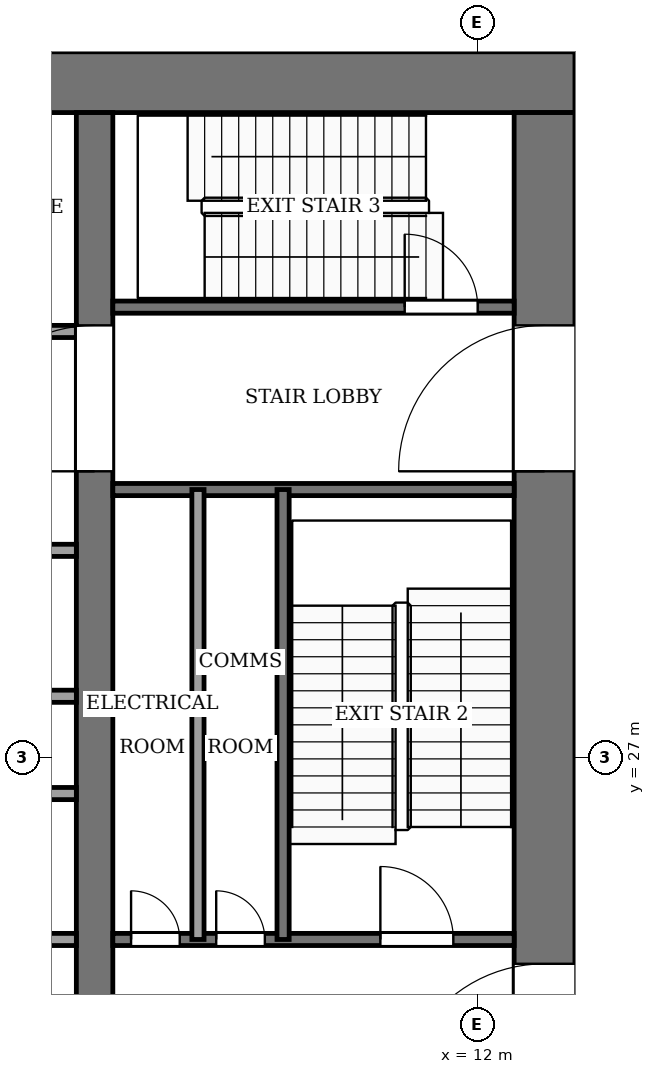
"""IFC4 building model, lengths in metres.
Left out: names, types, materials, properties, quantities, classifications, styles, units other than length and angle.
Written with IfcOpenShell. Run it as: python <this file> out.ifc"""

import sys

from ifc_helpers import new_model, si_unit, direction, frame, frame_2d, origin, place, context, subcontext, project, spatial, rectangle, extrude, element, fill, save


model = new_model("IFC4")
c1 = context("Model", 3, precision=1e-05, world=origin(), true_north=direction((0.0, 1.0)))
c2 = subcontext(c1, "Body", "Model", "MODEL_VIEW")
j1 = project(units=[si_unit("LENGTHUNIT", "METRE"), si_unit("PLANEANGLEUNIT", "RADIAN")], contexts=[c1])
p1 = place(None, origin())
s1 = spatial("IfcSite", under=j1, at=p1, CompositionType="ELEMENT")
p2 = place(p1, origin())
s2 = spatial("IfcBuilding", under=s1, at=p2, CompositionType="ELEMENT")
p3 = place(p2, frame((0.0, 0.0, 121.0)))
s3 = spatial("IfcBuildingStorey", under=s2, at=p3, CompositionType="ELEMENT", Elevation=121.0)
p4 = place(p3, frame((-13.6, 38.1, -0.13), z_axis=(0.0, 0.0, 1.0), x_axis=(1.0, 0.0, 0.0)))
e1 = element("IfcWall", 1, at=p4, inside=s3, PredefinedType="SHEAR", context=c2, shape_type="SweptSolid", body=[
    extrude(rectangle(XDim=27.2, YDim=1.0, at=frame_2d((13.6, 0.0))), origin(), (0.0, 0.0, 1.0), 5.0),
])
p5 = place(p3, frame((13.1, 18.4, -0.13), z_axis=(0.0, 0.0, 1.0), x_axis=(0.0, 1.0, 0.0)))
e2 = element("IfcWall", 2, at=p5, inside=s3, PredefinedType="SHEAR", context=c2, shape_type="SweptSolid", body=[
    extrude(rectangle(XDim=19.2, YDim=1.0, at=frame_2d((9.6, 0.0))), origin(), (0.0, 0.0, 1.0), 5.0),
])
p6 = place(p5, frame((2.8, 0.0, 0.13)))
e3 = element("IfcOpeningElement", 3, at=p6, cuts=e2, PredefinedType="OPENING", context=c2, shape_type="SweptSolid", body=[
    extrude(rectangle(XDim=2.4, YDim=2.4, at=frame_2d((1.2, 1.2))), frame((0.0, 0.51, 0.0), z_axis=(0.0, -1.0, 0.0), x_axis=(1.0, 0.0, 0.0)), (0.0, 0.0, 1.0), 1.02),
])
p7 = place(p5, frame((13.3, 0.0, 0.13)))
e4 = element("IfcOpeningElement", 4, at=p7, cuts=e2, PredefinedType="OPENING", context=c2, shape_type="SweptSolid", body=[
    extrude(rectangle(XDim=2.4, YDim=2.4, at=frame_2d((1.2, 1.2))), frame((0.0, 0.51, 0.0), z_axis=(0.0, -1.0, 0.0), x_axis=(1.0, 0.0, 0.0)), (0.0, 0.0, 1.0), 1.02),
])
p8 = place(p3, frame((5.7, 18.4, -0.13), z_axis=(0.0, 0.0, 1.0), x_axis=(0.0, 1.0, 0.0)))
e5 = element("IfcWall", 5, at=p8, inside=s3, PredefinedType="SHEAR", context=c2, shape_type="SweptSolid", body=[
    extrude(rectangle(XDim=19.2, YDim=0.6, at=frame_2d((9.6, 0.0))), origin(), (0.0, 0.0, 1.0), 5.0),
])
p9 = place(p8, frame((13.3, 0.0, 0.13)))
e6 = element("IfcOpeningElement", 6, at=p9, cuts=e5, PredefinedType="OPENING", context=c2, shape_type="SweptSolid", body=[
    extrude(rectangle(XDim=2.4, YDim=2.4, at=frame_2d((1.2, 1.2))), frame((0.0, 0.31, 0.0), z_axis=(0.0, -1.0, 0.0), x_axis=(1.0, 0.0, 0.0)), (0.0, 0.0, 1.0), 0.62),
])
p10 = place(p3, frame((-5.4, 24.0, 0.0), z_axis=(0.0, 0.0, 1.0), x_axis=(1.0, 0.0, 0.0)))
e7 = element("IfcWall", 7, at=p10, inside=s3, PredefinedType="PARTITIONING", context=c2, shape_type="SweptSolid", body=[
    extrude(rectangle(XDim=10.8, YDim=0.2, at=frame_2d((5.4, 0.0))), origin(), (0.0, 0.0, 1.0), 4.87),
])
p11 = place(p10, frame((0.75, 0.0, 0.0)))
e8 = element("IfcOpeningElement", 8, at=p11, cuts=e7, PredefinedType="OPENING", context=c2, shape_type="SweptSolid", body=[
    extrude(rectangle(XDim=1.2, YDim=2.2, at=frame_2d((0.6, 1.1))), frame((0.0, 0.11, 0.0), z_axis=(0.0, -1.0, 0.0), x_axis=(1.0, 0.0, 0.0)), (0.0, 0.0, 1.0), 0.22),
])
p12 = place(p10, frame((3.45, 0.0, 0.0)))
e9 = element("IfcOpeningElement", 9, at=p12, cuts=e7, PredefinedType="OPENING", context=c2, shape_type="SweptSolid", body=[
    extrude(rectangle(XDim=1.2, YDim=2.2, at=frame_2d((0.6, 1.1))), frame((0.0, 0.11, 0.0), z_axis=(0.0, -1.0, 0.0), x_axis=(1.0, 0.0, 0.0)), (0.0, 0.0, 1.0), 0.22),
])
p13 = place(p10, frame((6.15, 0.0, 0.0)))
e10 = element("IfcOpeningElement", 10, at=p13, cuts=e7, PredefinedType="OPENING", context=c2, shape_type="SweptSolid", body=[
    extrude(rectangle(XDim=1.2, YDim=2.2, at=frame_2d((0.6, 1.1))), frame((0.0, 0.11, 0.0), z_axis=(0.0, -1.0, 0.0), x_axis=(1.0, 0.0, 0.0)), (0.0, 0.0, 1.0), 0.22),
])
p14 = place(p10, frame((8.85, 0.0, 0.0)))
e11 = element("IfcOpeningElement", 11, at=p14, cuts=e7, PredefinedType="OPENING", context=c2, shape_type="SweptSolid", body=[
    extrude(rectangle(XDim=1.2, YDim=2.2, at=frame_2d((0.6, 1.1))), frame((0.0, 0.11, 0.0), z_axis=(0.0, -1.0, 0.0), x_axis=(1.0, 0.0, 0.0)), (0.0, 0.0, 1.0), 0.22),
])
p15 = place(p3, frame((6.0, 24.0, 0.0), z_axis=(0.0, 0.0, 1.0), x_axis=(1.0, 0.0, 0.0)))
e12 = element("IfcWall", 12, at=p15, inside=s3, PredefinedType="PARTITIONING", context=c2, shape_type="SweptSolid", body=[
    extrude(rectangle(XDim=6.6, YDim=0.2, at=frame_2d((3.3, 0.0))), origin(), (0.0, 0.0, 1.0), 4.87),
])
p16 = place(p15, frame((0.3, 0.0, 0.0)))
e13 = element("IfcOpeningElement", 13, at=p16, cuts=e12, PredefinedType="OPENING", context=c2, shape_type="SweptSolid", body=[
    extrude(rectangle(XDim=0.8, YDim=2.1, at=frame_2d((0.4, 1.05))), frame((0.0, 0.11, 0.0), z_axis=(0.0, -1.0, 0.0), x_axis=(1.0, 0.0, 0.0)), (0.0, 0.0, 1.0), 0.22),
])
p17 = place(p15, frame((1.7, 0.0, 0.0)))
e14 = element("IfcOpeningElement", 14, at=p17, cuts=e12, PredefinedType="OPENING", context=c2, shape_type="SweptSolid", body=[
    extrude(rectangle(XDim=0.8, YDim=2.1, at=frame_2d((0.4, 1.05))), frame((0.0, 0.11, 0.0), z_axis=(0.0, -1.0, 0.0), x_axis=(1.0, 0.0, 0.0)), (0.0, 0.0, 1.0), 0.22),
])
p18 = place(p15, frame((4.4, 0.0, 0.0)))
e15 = element("IfcOpeningElement", 15, at=p18, cuts=e12, PredefinedType="OPENING", context=c2, shape_type="SweptSolid", body=[
    extrude(rectangle(XDim=1.2, YDim=2.2, at=frame_2d((0.6, 1.1))), frame((0.0, 0.11, 0.0), z_axis=(0.0, -1.0, 0.0), x_axis=(1.0, 0.0, 0.0)), (0.0, 0.0, 1.0), 0.22),
])
for number, where, z_axis, x_axis in (
    (16, (-5.4, 26.4, 0.0), (0.0, 0.0, 1.0), (1.0, 0.0, 0.0)),
    (17, (-5.4, 28.0, 0.0), (0.0, 0.0, 1.0), (1.0, 0.0, 0.0)),
    (18, (-5.4, 30.4, 0.0), (0.0, 0.0, 1.0), (1.0, 0.0, 0.0)),
):
    element("IfcWall", number, at=place(p3, frame(where, z_axis=z_axis, x_axis=x_axis)), inside=s3, PredefinedType="PARTITIONING", context=c2, shape_type="SweptSolid", body=[
        extrude(rectangle(XDim=10.8, YDim=0.2, at=frame_2d((5.4, 0.0))), origin(), (0.0, 0.0, 1.0), 4.87),
    ])
p19 = place(p3, frame((6.0, 31.4, 0.0), z_axis=(0.0, 0.0, 1.0), x_axis=(1.0, 0.0, 0.0)))
e19 = element("IfcWall", 19, at=p19, inside=s3, PredefinedType="PARTITIONING", context=c2, shape_type="SweptSolid", body=[
    extrude(rectangle(XDim=6.6, YDim=0.2, at=frame_2d((3.3, 0.0))), origin(), (0.0, 0.0, 1.0), 4.87),
])
p20 = place(p3, frame((-5.4, 34.0, 0.0), z_axis=(0.0, 0.0, 1.0), x_axis=(1.0, 0.0, 0.0)))
e20 = element("IfcWall", 20, at=p20, inside=s3, PredefinedType="PARTITIONING", context=c2, shape_type="SweptSolid", body=[
    extrude(rectangle(XDim=10.8, YDim=0.2, at=frame_2d((5.4, 0.0))), origin(), (0.0, 0.0, 1.0), 4.87),
])
p21 = place(p20, frame((6.15, 0.0, 0.0)))
e21 = element("IfcOpeningElement", 21, at=p21, cuts=e20, PredefinedType="OPENING", context=c2, shape_type="SweptSolid", body=[
    extrude(rectangle(XDim=1.2, YDim=2.2, at=frame_2d((0.6, 1.1))), frame((0.0, 0.11, 0.0), z_axis=(0.0, -1.0, 0.0), x_axis=(1.0, 0.0, 0.0)), (0.0, 0.0, 1.0), 0.22),
])
p22 = place(p20, frame((8.95, 0.0, 0.0)))
e22 = element("IfcOpeningElement", 22, at=p22, cuts=e20, PredefinedType="OPENING", context=c2, shape_type="SweptSolid", body=[
    extrude(rectangle(XDim=1.0, YDim=2.1, at=frame_2d((0.5, 1.05))), frame((0.0, 0.11, 0.0), z_axis=(0.0, -1.0, 0.0), x_axis=(1.0, 0.0, 0.0)), (0.0, 0.0, 1.0), 0.22),
])
p23 = place(p3, frame((6.0, 34.4, 0.0), z_axis=(0.0, 0.0, 1.0), x_axis=(1.0, 0.0, 0.0)))
e23 = element("IfcWall", 23, at=p23, inside=s3, PredefinedType="PARTITIONING", context=c2, shape_type="SweptSolid", body=[
    extrude(rectangle(XDim=6.6, YDim=0.2, at=frame_2d((3.3, 0.0))), origin(), (0.0, 0.0, 1.0), 4.87),
])
p24 = place(p23, frame((4.8, 0.0, 0.0)))
e24 = element("IfcOpeningElement", 24, at=p24, cuts=e23, PredefinedType="OPENING", context=c2, shape_type="SweptSolid", body=[
    extrude(rectangle(XDim=1.2, YDim=2.2, at=frame_2d((0.6, 1.1))), frame((0.0, 0.11, 0.0), z_axis=(0.0, -1.0, 0.0), x_axis=(1.0, 0.0, 0.0)), (0.0, 0.0, 1.0), 0.22),
])
for number, where, z_axis, x_axis in (
    (25, (7.4, 24.0, 0.0), (0.0, 0.0, 1.0), (0.0, 1.0, 0.0)),
    (26, (8.8, 24.0, 0.0), (0.0, 0.0, 1.0), (0.0, 1.0, 0.0)),
):
    element("IfcWall", number, at=place(p3, frame(where, z_axis=z_axis, x_axis=x_axis)), inside=s3, PredefinedType="PARTITIONING", context=c2, shape_type="SweptSolid", body=[
        extrude(rectangle(XDim=7.4, YDim=0.2, at=frame_2d((3.7, 0.0))), origin(), (0.0, 0.0, 1.0), 4.87),
    ])
p25 = place(p16, origin())
e27 = element("IfcDoor", 27, at=p25, inside=s3, OperationType="SINGLE_SWING_LEFT", PredefinedType="DOOR", context=c2, shape_type="SweptSolid", body=[
    extrude(rectangle(XDim=0.8, YDim=2.1, at=frame_2d((0.4, 1.05))), frame((0.0, 0.025, 0.0), z_axis=(0.0, -1.0, 0.0), x_axis=(1.0, 0.0, 0.0)), (0.0, 0.0, 1.0), 0.05),
])
fill(e13, e27)
p26 = place(p17, origin())
e28 = element("IfcDoor", 28, at=p26, inside=s3, OperationType="SINGLE_SWING_RIGHT", PredefinedType="DOOR", context=c2, shape_type="SweptSolid", body=[
    extrude(rectangle(XDim=0.8, YDim=2.1, at=frame_2d((0.4, 1.05))), frame((0.0, 0.025, 0.0), z_axis=(0.0, -1.0, 0.0), x_axis=(1.0, 0.0, 0.0)), (0.0, 0.0, 1.0), 0.05),
])
fill(e14, e28)
p27 = place(p18, origin())
e29 = element("IfcDoor", 29, at=p27, inside=s3, OperationType="SINGLE_SWING_LEFT", PredefinedType="DOOR", context=c2, shape_type="SweptSolid", body=[
    extrude(rectangle(XDim=1.2, YDim=2.2, at=frame_2d((0.6, 1.1))), frame((0.0, 0.025, 0.0), z_axis=(0.0, -1.0, 0.0), x_axis=(1.0, 0.0, 0.0)), (0.0, 0.0, 1.0), 0.05),
])
fill(e15, e29)
p28 = place(p24, origin())
e30 = element("IfcDoor", 30, at=p28, inside=s3, OperationType="SINGLE_SWING_RIGHT", PredefinedType="DOOR", context=c2, shape_type="SweptSolid", body=[
    extrude(rectangle(XDim=1.2, YDim=2.2, at=frame_2d((0.6, 1.1))), frame((0.0, 0.025, 0.0), z_axis=(0.0, -1.0, 0.0), x_axis=(1.0, 0.0, 0.0)), (0.0, 0.0, 1.0), 0.05),
])
fill(e24, e30)
p29 = place(p9, origin())
e31 = element("IfcDoor", 31, at=p29, inside=s3, OperationType="DOUBLE_DOOR_SINGLE_SWING", PredefinedType="DOOR", context=c2, shape_type="SweptSolid", body=[
    extrude(rectangle(XDim=2.4, YDim=2.4, at=frame_2d((1.2, 1.2))), frame((0.0, 0.025, 0.0), z_axis=(0.0, -1.0, 0.0), x_axis=(1.0, 0.0, 0.0)), (0.0, 0.0, 1.0), 0.05),
])
fill(e6, e31)
p30 = place(p6, origin())
e32 = element("IfcDoor", 32, at=p30, inside=s3, OperationType="DOUBLE_DOOR_SINGLE_SWING", PredefinedType="DOOR", context=c2, shape_type="SweptSolid", body=[
    extrude(rectangle(XDim=2.4, YDim=2.4, at=frame_2d((1.2, 1.2))), frame((0.0, 0.025, 0.0), z_axis=(0.0, -1.0, 0.0), x_axis=(1.0, 0.0, 0.0)), (0.0, 0.0, 1.0), 0.05),
])
fill(e3, e32)
p31 = place(p7, origin())
e33 = element("IfcDoor", 33, at=p31, inside=s3, OperationType="DOUBLE_DOOR_SINGLE_SWING", PredefinedType="DOOR", context=c2, shape_type="SweptSolid", body=[
    extrude(rectangle(XDim=2.4, YDim=2.4, at=frame_2d((1.2, 1.2))), frame((0.0, 0.025, 0.0), z_axis=(0.0, -1.0, 0.0), x_axis=(1.0, 0.0, 0.0)), (0.0, 0.0, 1.0), 0.05),
])
fill(e4, e33)
save(model, sys.argv[1])
